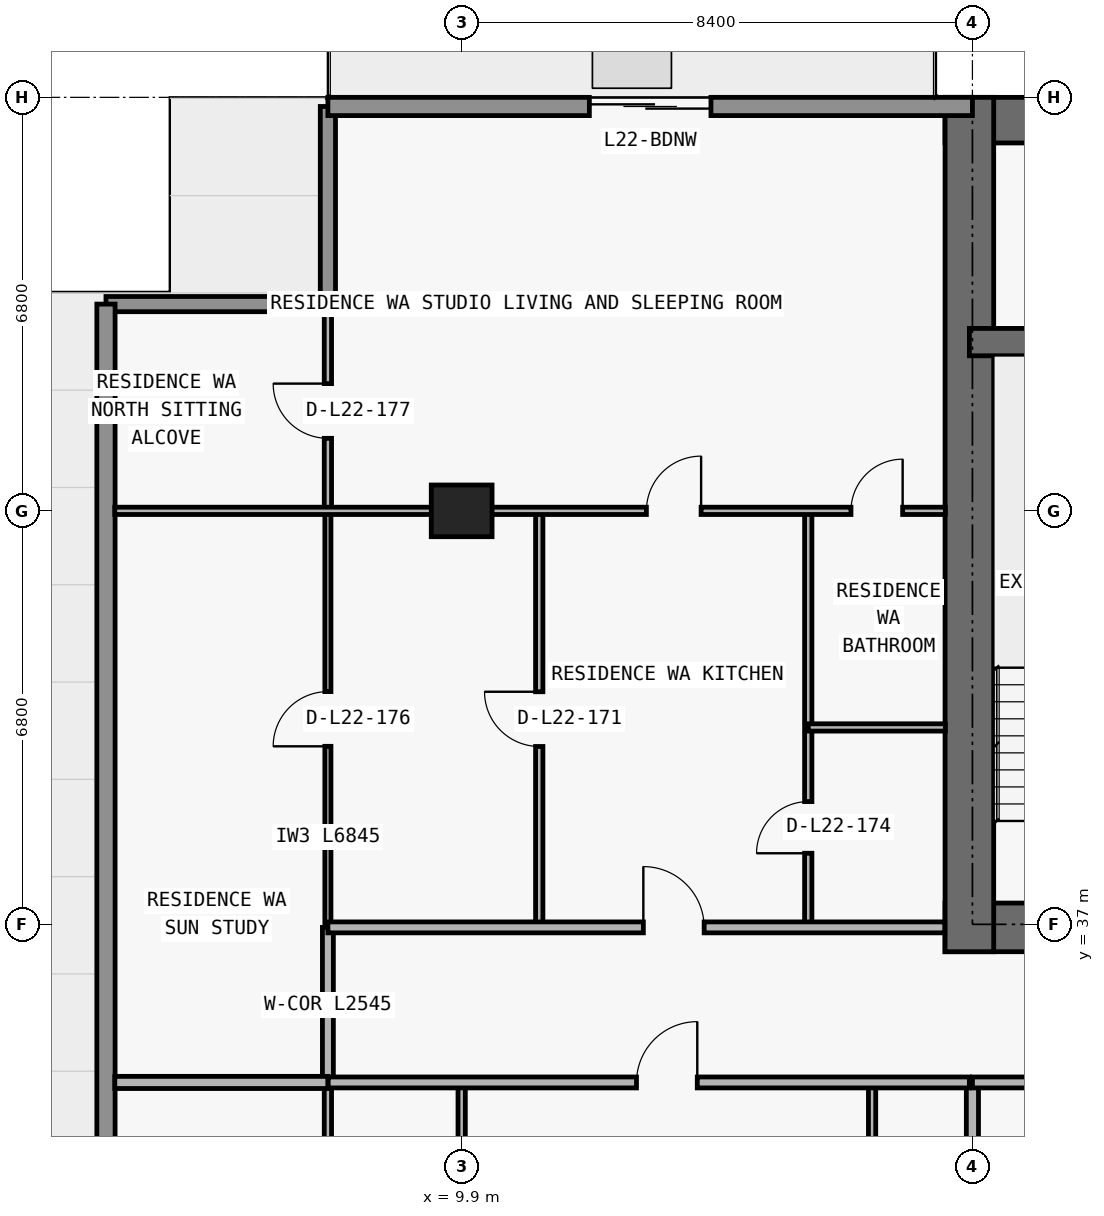
"""IFC4 building model, lengths in metres.
Left out: names, types, materials, properties, quantities, classifications, styles, units other than length and angle.
Written with IfcOpenShell. Run it as: python <this file> out.ifc"""

import sys

from ifc_helpers import new_model, si_unit, direction, frame, frame_2d, origin, origin_2d, place, context, subcontext, project, spatial, rectangle, extrude, element, fill, save


model = new_model("IFC4")
c1 = context("Model", 3, precision=1e-05, world=origin(), true_north=direction((0.0, 1.0)))
c2 = subcontext(c1, "Body", "Model", "MODEL_VIEW")
j1 = project(units=[si_unit("LENGTHUNIT", "METRE"), si_unit("PLANEANGLEUNIT", "RADIAN")], contexts=[c1])
p1 = place(None, origin())
s1 = spatial("IfcSite", under=j1, at=p1, CompositionType="ELEMENT")
p2 = place(p1, origin())
s2 = spatial("IfcBuilding", under=s1, at=p2, CompositionType="ELEMENT")
p3 = place(p2, frame((0.0, 0.0, 84.6)))
s3 = spatial("IfcBuildingStorey", under=s2, at=p3, CompositionType="ELEMENT", Elevation=84.6)
p4 = place(p3, frame((9.9, 43.8, 0.0), z_axis=(0.0, 0.0, 1.0), x_axis=(1.0, 0.0, 0.0)))
e1 = element("IfcColumn", 1, at=p4, inside=s3, PredefinedType="COLUMN", context=c2, shape_type="SweptSolid", body=[
    extrude(rectangle(XDim=1.0, YDim=0.85, at=origin_2d()), origin(), (0.0, 0.0, 1.0), 3.05),
])
p5 = place(p3, frame((17.85, 36.95, 0.0), z_axis=(0.0, 0.0, 1.0), x_axis=(1.0, 0.0, 0.0)))
e2 = element("IfcWall", 2, at=p5, inside=s3, PredefinedType="SHEAR", context=c2, shape_type="SweptSolid", body=[
    extrude(rectangle(XDim=42.1, YDim=0.8, at=frame_2d((21.05, 0.0))), origin(), (0.0, 0.0, 1.0), 3.05),
])
p6 = place(p5, frame((14.45, 0.0, 0.0)))
e3 = element("IfcOpeningElement", 3, at=p6, cuts=e2, PredefinedType="OPENING", context=c2, shape_type="SweptSolid", body=[
    extrude(rectangle(XDim=1.1, YDim=2.15, at=frame_2d((0.55, 1.075))), frame((0.0, 0.41, 0.0), z_axis=(0.0, -1.0, 0.0), x_axis=(1.0, 0.0, 0.0)), (0.0, 0.0, 1.0), 0.82),
])
p7 = place(p5, frame((6.3, 0.0, 0.0)))
e4 = element("IfcOpeningElement", 4, at=p7, cuts=e2, PredefinedType="OPENING", context=c2, shape_type="SweptSolid", body=[
    extrude(rectangle(XDim=1.05, YDim=2.15, at=frame_2d((0.525, 1.075))), frame((0.0, 0.41, 0.0), z_axis=(0.0, -1.0, 0.0), x_axis=(1.0, 0.0, 0.0)), (0.0, 0.0, 1.0), 0.82),
])
p8 = place(p5, frame((34.8, 0.0, 0.0)))
e5 = element("IfcOpeningElement", 5, at=p8, cuts=e2, PredefinedType="OPENING", context=c2, shape_type="SweptSolid", body=[
    extrude(rectangle(XDim=1.05, YDim=2.15, at=frame_2d((0.525, 1.075))), frame((0.0, 0.41, 0.0), z_axis=(0.0, -1.0, 0.0), x_axis=(1.0, 0.0, 0.0)), (0.0, 0.0, 1.0), 0.82),
])
p9 = place(p5, frame((10.913, 0.0, 0.0)))
e6 = element("IfcOpeningElement", 6, at=p9, cuts=e2, PredefinedType="OPENING", context=c2, shape_type="SweptSolid", body=[
    extrude(rectangle(XDim=1.05, YDim=2.15, at=frame_2d((0.525, 1.075))), frame((0.0, 0.41, 0.0), z_axis=(0.0, -1.0, 0.0), x_axis=(1.0, 0.0, 0.0)), (0.0, 0.0, 1.0), 0.82),
])
p10 = place(p5, frame((24.15, 0.0, 0.0)))
e7 = element("IfcOpeningElement", 7, at=p10, cuts=e2, PredefinedType="OPENING", context=c2, shape_type="SweptSolid", body=[
    extrude(rectangle(XDim=1.05, YDim=2.15, at=frame_2d((0.525, 1.075))), frame((0.0, 0.41, 0.0), z_axis=(0.0, -1.0, 0.0), x_axis=(1.0, 0.0, 0.0)), (0.0, 0.0, 1.0), 0.82),
])
p11 = place(p3, frame((17.85, 50.225, 0.0), z_axis=(0.0, 0.0, 1.0), x_axis=(1.0, 0.0, 0.0)))
e8 = element("IfcWall", 8, at=p11, inside=s3, PredefinedType="SHEAR", context=c2, shape_type="SweptSolid", body=[
    extrude(rectangle(XDim=42.1, YDim=0.75, at=frame_2d((21.05, 0.0))), origin(), (0.0, 0.0, 1.0), 3.05),
])
p12 = place(p3, frame((18.25, 36.55, 0.0), z_axis=(0.0, 0.0, 1.0), x_axis=(0.0, 1.0, 0.0)))
e9 = element("IfcWall", 9, at=p12, inside=s3, PredefinedType="SHEAR", context=c2, shape_type="SweptSolid", body=[
    extrude(rectangle(XDim=14.05, YDim=0.8, at=frame_2d((7.025, 0.0))), origin(), (0.0, 0.0, 1.0), 3.05),
])
p13 = place(p3, frame((18.25, 46.575, 0.0), z_axis=(0.0, 0.0, 1.0), x_axis=(1.0, 0.0, 0.0)))
e10 = element("IfcWall", 10, at=p13, inside=s3, PredefinedType="SHEAR", context=c2, shape_type="SweptSolid", body=[
    extrude(rectangle(XDim=41.3, YDim=0.45, at=frame_2d((20.65, 0.0))), origin(), (0.0, 0.0, 1.0), 3.05),
])
p14 = place(p13, frame((7.625, 0.0, 0.0)))
e11 = element("IfcOpeningElement", 11, at=p14, cuts=e10, PredefinedType="OPENING", context=c2, shape_type="SweptSolid", body=[
    extrude(rectangle(XDim=1.05, YDim=2.15, at=frame_2d((0.525, 1.075))), frame((0.0, 0.235, 0.0), z_axis=(0.0, -1.0, 0.0), x_axis=(1.0, 0.0, 0.0)), (0.0, 0.0, 1.0), 0.47),
])
p15 = place(p13, frame((32.675, 0.0, 0.0)))
e12 = element("IfcOpeningElement", 12, at=p15, cuts=e10, PredefinedType="OPENING", context=c2, shape_type="SweptSolid", body=[
    extrude(rectangle(XDim=1.05, YDim=2.15, at=frame_2d((0.525, 1.075))), frame((0.0, 0.235, 0.0), z_axis=(0.0, -1.0, 0.0), x_axis=(1.0, 0.0, 0.0)), (0.0, 0.0, 1.0), 0.47),
])
p16 = place(p3, frame((4.05, 47.2, 0.0), z_axis=(0.0, 0.0, 1.0), x_axis=(1.0, 0.0, 0.0)))
e13 = element("IfcWall", 13, at=p16, inside=s3, PredefinedType="ELEMENTEDWALL", context=c2, shape_type="SweptSolid", body=[
    extrude(rectangle(XDim=3.65, YDim=0.25, at=frame_2d((1.825, 0.0))), origin(), (0.0, 0.0, 1.0), 3.05),
])
p17 = place(p3, frame((7.7, 47.2, 0.0), z_axis=(0.0, 0.0, 1.0), x_axis=(0.0, 1.0, 0.0)))
e14 = element("IfcWall", 14, at=p17, inside=s3, PredefinedType="ELEMENTEDWALL", context=c2, shape_type="SweptSolid", body=[
    extrude(rectangle(XDim=3.25, YDim=0.25, at=frame_2d((1.625, 0.0))), origin(), (0.0, 0.0, 1.0), 3.05),
])
p18 = place(p3, frame((4.05, 28.0, 0.0), z_axis=(0.0, 0.0, 1.0), x_axis=(0.0, 1.0, 0.0)))
e15 = element("IfcWall", 15, at=p18, inside=s3, PredefinedType="STANDARD", context=c2, shape_type="SweptSolid", body=[
    extrude(rectangle(XDim=19.2, YDim=0.3, at=frame_2d((9.6, 0.0))), origin(), (0.0, 0.0, 1.0), 3.05),
])
p19 = place(p3, frame((7.7, 50.45, 0.0), z_axis=(0.0, 0.0, 1.0), x_axis=(1.0, 0.0, 0.0)))
e16 = element("IfcWall", 16, at=p19, inside=s3, PredefinedType="STANDARD", context=c2, shape_type="SweptSolid", body=[
    extrude(rectangle(XDim=10.6, YDim=0.3, at=frame_2d((5.3, 0.0))), origin(), (0.0, 0.0, 1.0), 3.05),
])
p20 = place(p19, frame((4.3, 0.0, 0.0)))
e17 = element("IfcOpeningElement", 17, at=p20, cuts=e16, PredefinedType="OPENING", context=c2, shape_type="SweptSolid", body=[
    extrude(rectangle(XDim=2.0, YDim=2.3, at=frame_2d((1.0, 1.15))), frame((0.0, 0.16, 0.0), z_axis=(0.0, -1.0, 0.0), x_axis=(1.0, 0.0, 0.0)), (0.0, 0.0, 1.0), 0.32),
])
p21 = place(p3, frame((7.7, 27.44, 0.0), z_axis=(0.0, 0.0, 1.0), x_axis=(0.0, 1.0, 0.0)))
e18 = element("IfcWall", 18, at=p21, inside=s3, PredefinedType="PARTITIONING", context=c2, shape_type="SweptSolid", body=[
    extrude(rectangle(XDim=6.96, YDim=0.12, at=frame_2d((3.48, 0.0))), origin(), (0.0, 0.0, 1.0), 3.05),
])
p22 = place(p3, frame((7.7, 34.405, 0.0), z_axis=(0.0, 0.0, 1.0), x_axis=(0.0, 1.0, 0.0)))
e19 = element("IfcWall", 19, at=p22, inside=s3, PredefinedType="PARTITIONING", context=c2, shape_type="SweptSolid", body=[
    extrude(rectangle(XDim=2.545, YDim=0.18, at=frame_2d((1.272, 0.0))), origin(), (0.0, 0.0, 1.0), 3.05),
])
p23 = place(p3, frame((7.7, 36.955, 0.0), z_axis=(0.0, 0.0, 1.0), x_axis=(0.0, 1.0, 0.0)))
e20 = element("IfcWall", 20, at=p23, inside=s3, PredefinedType="MOVABLE", context=c2, shape_type="SweptSolid", body=[
    extrude(rectangle(XDim=6.845, YDim=0.1, at=frame_2d((3.422, 0.0))), origin(), (0.0, 0.0, 1.0), 3.05),
])
p24 = place(p23, frame((2.972, 0.0, 0.0)))
e21 = element("IfcOpeningElement", 21, at=p24, cuts=e20, PredefinedType="OPENING", context=c2, shape_type="SweptSolid", body=[
    extrude(rectangle(XDim=0.9, YDim=2.15, at=frame_2d((0.45, 1.075))), frame((0.0, 0.06, 0.0), z_axis=(0.0, -1.0, 0.0), x_axis=(1.0, 0.0, 0.0)), (0.0, 0.0, 1.0), 0.12),
])
p25 = place(p3, frame((7.7, 43.805, 0.0), z_axis=(0.0, 0.0, 1.0), x_axis=(0.0, 1.0, 0.0)))
e22 = element("IfcWall", 22, at=p25, inside=s3, PredefinedType="PARTITIONING", context=c2, shape_type="SweptSolid", body=[
    extrude(rectangle(XDim=3.275, YDim=0.12, at=frame_2d((1.638, 0.0))), origin(), (0.0, 0.0, 1.0), 3.05),
])
p26 = place(p25, frame((1.188, 0.0, 0.0)))
e23 = element("IfcOpeningElement", 23, at=p26, cuts=e22, PredefinedType="OPENING", context=c2, shape_type="SweptSolid", body=[
    extrude(rectangle(XDim=0.9, YDim=2.15, at=frame_2d((0.45, 1.075))), frame((0.0, 0.07, 0.0), z_axis=(0.0, -1.0, 0.0), x_axis=(1.0, 0.0, 0.0)), (0.0, 0.0, 1.0), 0.14),
])
p27 = place(p3, frame((9.9, 27.44, 0.0), z_axis=(0.0, 0.0, 1.0), x_axis=(0.0, 1.0, 0.0)))
e24 = element("IfcWall", 24, at=p27, inside=s3, PredefinedType="PARTITIONING", context=c2, shape_type="SweptSolid", body=[
    extrude(rectangle(XDim=6.96, YDim=0.12, at=frame_2d((3.48, 0.0))), origin(), (0.0, 0.0, 1.0), 2.174),
])
p28 = place(p3, frame((11.176, 36.95, 0.0), z_axis=(0.0, 0.0, 1.0), x_axis=(0.0, 1.0, 0.0)))
e25 = element("IfcWall", 25, at=p28, inside=s3, PredefinedType="PARTITIONING", context=c2, shape_type="SweptSolid", body=[
    extrude(rectangle(XDim=6.85, YDim=0.12, at=frame_2d((3.425, 0.0))), origin(), (0.0, 0.0, 1.0), 3.05),
])
p29 = place(p28, frame((2.975, 0.0, 0.0)))
e26 = element("IfcOpeningElement", 26, at=p29, cuts=e25, PredefinedType="OPENING", context=c2, shape_type="SweptSolid", body=[
    extrude(rectangle(XDim=0.9, YDim=2.15, at=frame_2d((0.45, 1.075))), frame((0.0, 0.07, 0.0), z_axis=(0.0, -1.0, 0.0), x_axis=(1.0, 0.0, 0.0)), (0.0, 0.0, 1.0), 0.14),
])
p30 = place(p3, frame((15.6, 36.95, 0.0), z_axis=(0.0, 0.0, 1.0), x_axis=(0.0, 1.0, 0.0)))
e27 = element("IfcWall", 27, at=p30, inside=s3, PredefinedType="PARTITIONING", context=c2, shape_type="SweptSolid", body=[
    extrude(rectangle(XDim=6.85, YDim=0.12, at=frame_2d((3.425, 0.0))), origin(), (0.0, 0.0, 1.0), 3.05),
])
p31 = place(p30, frame((1.219, 0.0, 0.0)))
e28 = element("IfcOpeningElement", 28, at=p31, cuts=e27, PredefinedType="OPENING", context=c2, shape_type="SweptSolid", body=[
    extrude(rectangle(XDim=0.85, YDim=2.1, at=frame_2d((0.425, 1.05))), frame((0.0, 0.07, 0.0), z_axis=(0.0, -1.0, 0.0), x_axis=(1.0, 0.0, 0.0)), (0.0, 0.0, 1.0), 0.14),
])
p32 = place(p3, frame((16.65, 27.44, 0.0), z_axis=(0.0, 0.0, 1.0), x_axis=(0.0, 1.0, 0.0)))
e29 = element("IfcWall", 29, at=p32, inside=s3, PredefinedType="PARTITIONING", context=c2, shape_type="SweptSolid", body=[
    extrude(rectangle(XDim=6.96, YDim=0.12, at=frame_2d((3.48, 0.0))), origin(), (0.0, 0.0, 1.0), 3.05),
])
p33 = place(p32, frame((3.055, 0.0, 0.0)))
e30 = element("IfcOpeningElement", 30, at=p33, cuts=e29, PredefinedType="OPENING", context=c2, shape_type="SweptSolid", body=[
    extrude(rectangle(XDim=0.85, YDim=2.1, at=frame_2d((0.425, 1.05))), frame((0.0, 0.07, 0.0), z_axis=(0.0, -1.0, 0.0), x_axis=(1.0, 0.0, 0.0)), (0.0, 0.0, 1.0), 0.14),
])
p34 = place(p3, frame((18.3, 27.44, 0.0), z_axis=(0.0, 0.0, 1.0), x_axis=(0.0, 1.0, 0.0)))
e31 = element("IfcWall", 31, at=p34, inside=s3, PredefinedType="PARTITIONING", context=c2, shape_type="SweptSolid", body=[
    extrude(rectangle(XDim=6.96, YDim=0.2, at=frame_2d((3.48, 0.0))), origin(), (0.0, 0.0, 1.0), 2.174),
])
p35 = place(p3, frame((4.195, 34.4, 0.0), z_axis=(0.0, 0.0, 1.0), x_axis=(1.0, 0.0, 0.0)))
e32 = element("IfcWall", 32, at=p35, inside=s3, PredefinedType="PARTITIONING", context=c2, shape_type="SweptSolid", body=[
    extrude(rectangle(XDim=3.505, YDim=0.2, at=frame_2d((1.752, 0.0))), origin(), (0.0, 0.0, 1.0), 3.05),
])
p36 = place(p3, frame((7.705, 34.4, 0.0), z_axis=(0.0, 0.0, 1.0), x_axis=(1.0, 0.0, 0.0)))
e33 = element("IfcWall", 33, at=p36, inside=s3, PredefinedType="PARTITIONING", context=c2, shape_type="SweptSolid", body=[
    extrude(rectangle(XDim=10.545, YDim=0.18, at=frame_2d((5.272, 0.0))), origin(), (0.0, 0.0, 1.0), 3.05),
])
p37 = place(p36, frame((5.07, 0.0, 0.0)))
e34 = element("IfcOpeningElement", 34, at=p37, cuts=e33, PredefinedType="OPENING", context=c2, shape_type="SweptSolid", body=[
    extrude(rectangle(XDim=1.0, YDim=2.2, at=frame_2d((0.5, 1.1))), frame((0.0, 0.1, 0.0), z_axis=(0.0, -1.0, 0.0), x_axis=(1.0, 0.0, 0.0)), (0.0, 0.0, 1.0), 0.2),
])
p38 = place(p3, frame((18.3, 34.4, 0.0), z_axis=(0.0, 0.0, 1.0), x_axis=(1.0, 0.0, 0.0)))
e35 = element("IfcWall", 35, at=p38, inside=s3, PredefinedType="PARTITIONING", context=c2, shape_type="SweptSolid", body=[
    extrude(rectangle(XDim=8.35, YDim=0.18, at=frame_2d((4.175, 0.0))), origin(), (0.0, 0.0, 1.0), 3.05),
])
p39 = place(p38, frame((2.875, 0.0, 0.0)))
e36 = element("IfcOpeningElement", 36, at=p39, cuts=e35, PredefinedType="OPENING", context=c2, shape_type="SweptSolid", body=[
    extrude(rectangle(XDim=1.0, YDim=2.2, at=frame_2d((0.5, 1.1))), frame((0.0, 0.1, 0.0), z_axis=(0.0, -1.0, 0.0), x_axis=(1.0, 0.0, 0.0)), (0.0, 0.0, 1.0), 0.2),
])
p40 = place(p3, frame((7.7, 36.95, 0.0), z_axis=(0.0, 0.0, 1.0), x_axis=(1.0, 0.0, 0.0)))
e37 = element("IfcWall", 37, at=p40, inside=s3, PredefinedType="PARTITIONING", context=c2, shape_type="SweptSolid", body=[
    extrude(rectangle(XDim=10.145, YDim=0.18, at=frame_2d((5.073, 0.0))), origin(), (0.0, 0.0, 1.0), 3.05),
])
p41 = place(p40, frame((5.188, 0.0, 0.0)))
e38 = element("IfcOpeningElement", 38, at=p41, cuts=e37, PredefinedType="OPENING", context=c2, shape_type="SweptSolid", body=[
    extrude(rectangle(XDim=1.0, YDim=2.2, at=frame_2d((0.5, 1.1))), frame((0.0, 0.1, 0.0), z_axis=(0.0, -1.0, 0.0), x_axis=(1.0, 0.0, 0.0)), (0.0, 0.0, 1.0), 0.2),
])
p42 = place(p3, frame((15.6, 40.238, 0.0), z_axis=(0.0, 0.0, 1.0), x_axis=(1.0, 0.0, 0.0)))
e39 = element("IfcWall", 39, at=p42, inside=s3, PredefinedType="PARTITIONING", context=c2, shape_type="SweptSolid", body=[
    extrude(rectangle(XDim=2.255, YDim=0.12, at=frame_2d((1.127, 0.0))), origin(), (0.0, 0.0, 1.0), 3.05),
])
p43 = place(p3, frame((4.195, 43.8, 0.0), z_axis=(0.0, 0.0, 1.0), x_axis=(1.0, 0.0, 0.0)))
e40 = element("IfcWall", 40, at=p43, inside=s3, PredefinedType="PARTITIONING", context=c2, shape_type="SweptSolid", body=[
    extrude(rectangle(XDim=13.66, YDim=0.12, at=frame_2d((6.83, 0.0))), origin(), (0.0, 0.0, 1.0), 2.339),
])
p44 = place(p43, frame((8.743, 0.0, 0.0)))
e41 = element("IfcOpeningElement", 41, at=p44, cuts=e40, PredefinedType="OPENING", context=c2, shape_type="SweptSolid", body=[
    extrude(rectangle(XDim=0.9, YDim=2.15, at=frame_2d((0.45, 1.075))), frame((0.0, 0.07, 0.0), z_axis=(0.0, -1.0, 0.0), x_axis=(1.0, 0.0, 0.0)), (0.0, 0.0, 1.0), 0.14),
])
p45 = place(p43, frame((12.107, 0.0, 0.0)))
e42 = element("IfcOpeningElement", 42, at=p45, cuts=e40, PredefinedType="OPENING", context=c2, shape_type="SweptSolid", body=[
    extrude(rectangle(XDim=0.85, YDim=2.1, at=frame_2d((0.425, 1.05))), frame((0.0, 0.07, 0.0), z_axis=(0.0, -1.0, 0.0), x_axis=(1.0, 0.0, 0.0)), (0.0, 0.0, 1.0), 0.14),
])
p46 = place(p20, origin())
e43 = element("IfcDoor", 43, at=p46, inside=s3, OperationType="DOUBLE_DOOR_SLIDING", PredefinedType="DOOR", context=c2, shape_type="SweptSolid", body=[
    extrude(rectangle(XDim=2.0, YDim=2.3, at=frame_2d((1.0, 1.15))), frame((0.0, 0.025, 0.0), z_axis=(0.0, -1.0, 0.0), x_axis=(1.0, 0.0, 0.0)), (0.0, 0.0, 1.0), 0.05),
])
fill(e17, e43)
p47 = place(p37, origin())
e44 = element("IfcDoor", 44, at=p47, inside=s3, OperationType="SINGLE_SWING_RIGHT", PredefinedType="DOOR", context=c2, shape_type="SweptSolid", body=[
    extrude(rectangle(XDim=1.0, YDim=2.2, at=frame_2d((0.5, 1.1))), frame((0.0, 0.025, 0.0), z_axis=(0.0, -1.0, 0.0), x_axis=(1.0, 0.0, 0.0)), (0.0, 0.0, 1.0), 0.05),
])
fill(e34, e44)
p48 = place(p29, origin())
e45 = element("IfcDoor", 45, at=p48, inside=s3, OperationType="SINGLE_SWING_RIGHT", PredefinedType="DOOR", context=c2, shape_type="SweptSolid", body=[
    extrude(rectangle(XDim=0.9, YDim=2.15, at=frame_2d((0.45, 1.075))), frame((0.0, 0.025, 0.0), z_axis=(0.0, -1.0, 0.0), x_axis=(1.0, 0.0, 0.0)), (0.0, 0.0, 1.0), 0.05),
])
fill(e26, e45)
p49 = place(p41, origin())
e46 = element("IfcDoor", 46, at=p49, inside=s3, OperationType="SINGLE_SWING_LEFT", PredefinedType="DOOR", context=c2, shape_type="SweptSolid", body=[
    extrude(rectangle(XDim=1.0, YDim=2.2, at=frame_2d((0.5, 1.1))), frame((0.0, 0.025, 0.0), z_axis=(0.0, -1.0, 0.0), x_axis=(1.0, 0.0, 0.0)), (0.0, 0.0, 1.0), 0.05),
])
fill(e38, e46)
p50 = place(p44, origin())
e47 = element("IfcDoor", 47, at=p50, inside=s3, OperationType="SINGLE_SWING_RIGHT", PredefinedType="DOOR", context=c2, shape_type="SweptSolid", body=[
    extrude(rectangle(XDim=0.9, YDim=2.15, at=frame_2d((0.45, 1.075))), frame((0.0, 0.025, 0.0), z_axis=(0.0, -1.0, 0.0), x_axis=(1.0, 0.0, 0.0)), (0.0, 0.0, 1.0), 0.05),
])
fill(e41, e47)
p51 = place(p31, origin())
e48 = element("IfcDoor", 48, at=p51, inside=s3, OperationType="SINGLE_SWING_LEFT", PredefinedType="DOOR", context=c2, shape_type="SweptSolid", body=[
    extrude(rectangle(XDim=0.85, YDim=2.1, at=frame_2d((0.425, 1.05))), frame((0.0, 0.025, 0.0), z_axis=(0.0, -1.0, 0.0), x_axis=(1.0, 0.0, 0.0)), (0.0, 0.0, 1.0), 0.05),
])
fill(e28, e48)
p52 = place(p45, origin())
e49 = element("IfcDoor", 49, at=p52, inside=s3, OperationType="SINGLE_SWING_RIGHT", PredefinedType="DOOR", context=c2, shape_type="SweptSolid", body=[
    extrude(rectangle(XDim=0.85, YDim=2.1, at=frame_2d((0.425, 1.05))), frame((0.0, 0.025, 0.0), z_axis=(0.0, -1.0, 0.0), x_axis=(1.0, 0.0, 0.0)), (0.0, 0.0, 1.0), 0.05),
])
fill(e42, e49)
p53 = place(p24, origin())
e50 = element("IfcDoor", 50, at=p53, inside=s3, OperationType="SINGLE_SWING_LEFT", PredefinedType="DOOR", context=c2, shape_type="SweptSolid", body=[
    extrude(rectangle(XDim=0.9, YDim=2.15, at=frame_2d((0.45, 1.075))), frame((0.0, 0.025, 0.0), z_axis=(0.0, -1.0, 0.0), x_axis=(1.0, 0.0, 0.0)), (0.0, 0.0, 1.0), 0.05),
])
fill(e21, e50)
p54 = place(p26, origin())
e51 = element("IfcDoor", 51, at=p54, inside=s3, OperationType="SINGLE_SWING_RIGHT", PredefinedType="DOOR", context=c2, shape_type="SweptSolid", body=[
    extrude(rectangle(XDim=0.9, YDim=2.15, at=frame_2d((0.45, 1.075))), frame((0.0, 0.025, 0.0), z_axis=(0.0, -1.0, 0.0), x_axis=(1.0, 0.0, 0.0)), (0.0, 0.0, 1.0), 0.05),
])
fill(e23, e51)
save(model, sys.argv[1])
